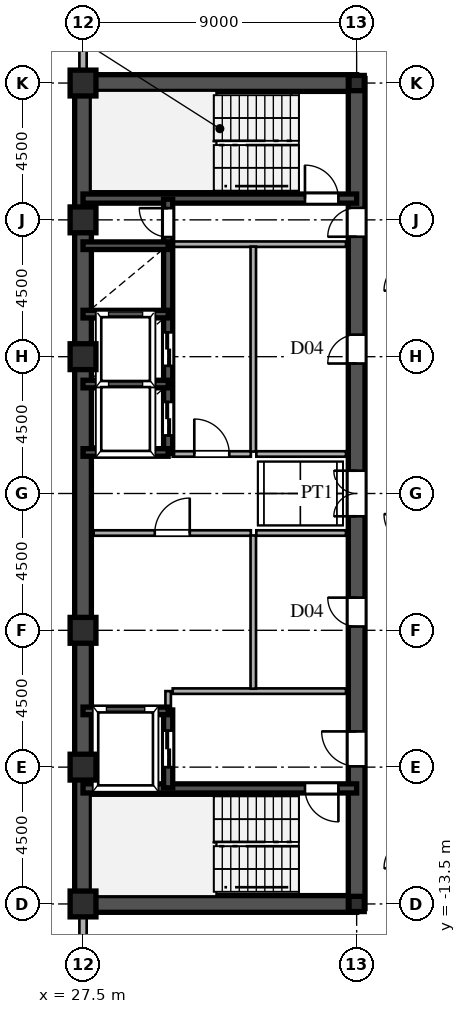
"""IFC4 building model, lengths in metres.
Left out: names, types, materials, properties, quantities, classifications, styles, units other than length and angle.
Written with IfcOpenShell. Run it as: python <this file> out.ifc"""

import sys

from ifc_helpers import new_model, si_unit, direction, frame, frame_2d, origin, origin_2d, place, context, subcontext, project, spatial, rectangle, hollow_rectangle, i_section, extrude, source, transform, mapped, element, fill, save


model = new_model("IFC4")
c1 = context("Model", 3, precision=1e-05, world=origin(), true_north=direction((0.0, 1.0)))
c2 = subcontext(c1, "Body", "Model", "MODEL_VIEW")
j1 = project(units=[si_unit("LENGTHUNIT", "METRE"), si_unit("PLANEANGLEUNIT", "RADIAN")], contexts=[c1])
p1 = place(None, origin())
s1 = spatial("IfcSite", under=j1, at=p1, CompositionType="ELEMENT")
p2 = place(p1, origin())
s2 = spatial("IfcBuilding", under=s1, at=p2, CompositionType="ELEMENT")
p3 = place(p2, frame((0.0, 0.0, 199.5)))
s3 = spatial("IfcBuildingStorey", under=s2, at=p3, CompositionType="ELEMENT", Elevation=199.5)
m1 = source(origin(), c2, "Body", "SweptSolid", [
    extrude(hollow_rectangle(XDim=0.85, YDim=0.85, WallThickness=0.036, at=origin_2d()), origin(), (0.0, 0.0, 1.0), 3.6),
])
for number, where, z_axis, x_axis in (
    (1, (27.5, -13.5, 0.0), (0.0, 0.0, 1.0), (1.0, 0.0, 0.0)),
    (2, (27.5, -9.0, 0.0), (0.0, 0.0, 1.0), (1.0, 0.0, 0.0)),
    (3, (27.5, -4.5, 0.0), (0.0, 0.0, 1.0), (1.0, 0.0, 0.0)),
    (4, (27.5, 4.5, 0.0), (0.0, 0.0, 1.0), (1.0, 0.0, 0.0)),
    (5, (27.5, 9.0, 0.0), (0.0, 0.0, 1.0), (1.0, 0.0, 0.0)),
    (6, (27.5, 13.5, 0.0), (0.0, 0.0, 1.0), (1.0, 0.0, 0.0)),
):
    element("IfcColumn", number, at=place(p3, frame(where, z_axis=z_axis, x_axis=x_axis)), inside=s3, PredefinedType="COLUMN", context=c2, shape_type="MappedRepresentation", body=[
        mapped(m1, transform((0.0, 0.0, 0.0), scale=1.0)),
    ])
m2 = source(origin(), c2, "Body", "SweptSolid", [
    extrude(i_section(OverallWidth=0.5, OverallDepth=0.5, WebThickness=0.02, FlangeThickness=0.032, at=origin_2d()), origin(), (0.0, 0.0, 1.0), 3.6),
])
for number, where, z_axis, x_axis in (
    (7, (36.5, -13.5, 0.0), (0.0, 0.0, 1.0), (1.0, 0.0, 0.0)),
    (8, (36.5, 13.5, 0.0), (0.0, 0.0, 1.0), (1.0, 0.0, 0.0)),
):
    element("IfcColumn", number, at=place(p3, frame(where, z_axis=z_axis, x_axis=x_axis)), inside=s3, PredefinedType="COLUMN", context=c2, shape_type="MappedRepresentation", body=[
        mapped(m2, transform((0.0, 0.0, 0.0), scale=1.0)),
    ])
p4 = place(p3, frame((27.5, -15.98, 0.0), z_axis=(0.0, 0.0, 1.0), x_axis=(0.0, 1.0, 0.0)))
e9 = element("IfcWall", 9, at=p4, inside=s3, PredefinedType="SOLIDWALL", context=c2, shape_type="SweptSolid", body=[
    extrude(rectangle(XDim=1.6, YDim=0.24, at=frame_2d((0.8, 0.0))), origin(), (0.0, 0.0, 1.0), 3.38),
])
for number, where, z_axis, x_axis in (
    (10, (27.5, -14.38, 0.0), (0.0, 0.0, 1.0), (0.0, 1.0, 0.0)),
    (11, (27.5, 13.78, 0.0), (0.0, 0.0, 1.0), (0.0, 1.0, 0.0)),
):
    element("IfcWall", number, at=place(p3, frame(where, z_axis=z_axis, x_axis=x_axis)), inside=s3, PredefinedType="SOLIDWALL", context=c2, shape_type="SweptSolid", body=[
        extrude(rectangle(XDim=0.6, YDim=0.24, at=frame_2d((0.3, 0.0))), origin(), (0.0, 0.0, 1.0), 2.88),
    ])
p5 = place(p3, frame((27.5, 14.38, 0.0), z_axis=(0.0, 0.0, 1.0), x_axis=(0.0, 1.0, 0.0)))
e12 = element("IfcWall", 12, at=p5, inside=s3, PredefinedType="SOLIDWALL", context=c2, shape_type="SweptSolid", body=[
    extrude(rectangle(XDim=1.6, YDim=0.24, at=frame_2d((0.8, 0.0))), origin(), (0.0, 0.0, 1.0), 3.38),
])
for number, where, z_axis, x_axis in (
    (13, (27.5, -13.5, 0.0), (0.0, 0.0, 1.0), (0.0, 1.0, 0.0)),
    (14, (27.5, 1.3, 0.0), (0.0, 0.0, 1.0), (0.0, 1.0, 0.0)),
):
    element("IfcWall", number, at=place(p3, frame(where, z_axis=z_axis, x_axis=x_axis)), inside=s3, PredefinedType="SHEAR", context=c2, shape_type="SweptSolid", body=[
        extrude(rectangle(XDim=12.2, YDim=0.55, at=frame_2d((6.1, 0.0))), origin(), (0.0, 0.0, 1.0), 3.38),
    ])
p6 = place(p3, frame((27.5, -1.3, 0.0), z_axis=(0.0, 0.0, 1.0), x_axis=(0.0, 1.0, 0.0)))
e15 = element("IfcWall", 15, at=p6, inside=s3, PredefinedType="SHEAR", context=c2, shape_type="SweptSolid", body=[
    extrude(rectangle(XDim=2.6, YDim=0.55, at=frame_2d((1.3, 0.0))), origin(), (0.0, 0.0, 1.0), 3.38),
])
for number, where, z_axis, x_axis in (
    (16, (27.5, -13.5, 0.0), (0.0, 0.0, 1.0), (1.0, 0.0, 0.0)),
    (17, (27.5, 13.5, 0.0), (0.0, 0.0, 1.0), (1.0, 0.0, 0.0)),
):
    element("IfcWall", number, at=place(p3, frame(where, z_axis=z_axis, x_axis=x_axis)), inside=s3, PredefinedType="SHEAR", context=c2, shape_type="SweptSolid", body=[
        extrude(rectangle(XDim=9.0, YDim=0.55, at=frame_2d((4.5, 0.0))), origin(), (0.0, 0.0, 1.0), 3.38),
    ])
p7 = place(p3, frame((36.5, -13.65, 0.0), z_axis=(0.0, 0.0, 1.0), x_axis=(0.0, 1.0, 0.0)))
e18 = element("IfcWall", 18, at=p7, inside=s3, PredefinedType="SHEAR", context=c2, shape_type="SweptSolid", body=[
    extrude(rectangle(XDim=7.15, YDim=0.55, at=frame_2d((3.575, 0.0))), origin(), (0.0, 0.0, 1.0), 3.38),
])
p8 = place(p7, frame((4.675, 0.0, 0.0)))
e19 = element("IfcOpeningElement", 19, at=p8, cuts=e18, PredefinedType="OPENING", context=c2, shape_type="SweptSolid", body=[
    extrude(rectangle(XDim=1.15, YDim=2.2, at=frame_2d((0.575, 1.1))), frame((0.0, 0.285, 0.0), z_axis=(0.0, -1.0, 0.0), x_axis=(1.0, 0.0, 0.0)), (0.0, 0.0, 1.0), 0.57),
])
p9 = place(p3, frame((36.5, -1.3, 0.0), z_axis=(0.0, 0.0, 1.0), x_axis=(0.0, 1.0, 0.0)))
e20 = element("IfcWall", 20, at=p9, inside=s3, PredefinedType="SHEAR", context=c2, shape_type="SweptSolid", body=[
    extrude(rectangle(XDim=2.6, YDim=0.55, at=frame_2d((1.3, 0.0))), origin(), (0.0, 0.0, 1.0), 3.38),
])
p10 = place(p9, frame((0.55, 0.0, 0.0)))
e21 = element("IfcOpeningElement", 21, at=p10, cuts=e20, PredefinedType="OPENING", context=c2, shape_type="SweptSolid", body=[
    extrude(rectangle(XDim=1.5, YDim=2.3, at=frame_2d((0.75, 1.15))), frame((0.0, 0.285, 0.0), z_axis=(0.0, -1.0, 0.0), x_axis=(1.0, 0.0, 0.0)), (0.0, 0.0, 1.0), 0.57),
])
p11 = place(p3, frame((36.5, 8.2, 0.0), z_axis=(0.0, 0.0, 1.0), x_axis=(0.0, 1.0, 0.0)))
e22 = element("IfcWall", 22, at=p11, inside=s3, PredefinedType="SHEAR", context=c2, shape_type="SweptSolid", body=[
    extrude(rectangle(XDim=5.45, YDim=0.55, at=frame_2d((2.725, 0.0))), origin(), (0.0, 0.0, 1.0), 3.38),
])
p12 = place(p11, frame((0.245, 0.0, 0.0)))
e23 = element("IfcOpeningElement", 23, at=p12, cuts=e22, PredefinedType="OPENING", context=c2, shape_type="SweptSolid", body=[
    extrude(rectangle(XDim=0.95, YDim=2.15, at=frame_2d((0.475, 1.075))), frame((0.0, 0.285, 0.0), z_axis=(0.0, -1.0, 0.0), x_axis=(1.0, 0.0, 0.0)), (0.0, 0.0, 1.0), 0.57),
])
p13 = place(p3, frame((36.5, -6.5, 0.0), z_axis=(0.0, 0.0, 1.0), x_axis=(0.0, 1.0, 0.0)))
e24 = element("IfcWall", 24, at=p13, inside=s3, PredefinedType="SHEAR", context=c2, shape_type="SweptSolid", body=[
    extrude(rectangle(XDim=5.2, YDim=0.55, at=frame_2d((2.6, 0.0))), origin(), (0.0, 0.0, 1.0), 3.38),
])
p14 = place(p13, frame((2.125, 0.0, 0.0)))
e25 = element("IfcOpeningElement", 25, at=p14, cuts=e24, PredefinedType="OPENING", context=c2, shape_type="SweptSolid", body=[
    extrude(rectangle(XDim=0.95, YDim=2.15, at=frame_2d((0.475, 1.075))), frame((0.0, 0.285, 0.0), z_axis=(0.0, -1.0, 0.0), x_axis=(1.0, 0.0, 0.0)), (0.0, 0.0, 1.0), 0.57),
])
p15 = place(p3, frame((36.5, 1.3, 0.0), z_axis=(0.0, 0.0, 1.0), x_axis=(0.0, 1.0, 0.0)))
e26 = element("IfcWall", 26, at=p15, inside=s3, PredefinedType="SHEAR", context=c2, shape_type="SweptSolid", body=[
    extrude(rectangle(XDim=6.9, YDim=0.55, at=frame_2d((3.45, 0.0))), origin(), (0.0, 0.0, 1.0), 3.38),
])
p16 = place(p15, frame((2.975, 0.0, 0.0)))
e27 = element("IfcOpeningElement", 27, at=p16, cuts=e26, PredefinedType="OPENING", context=c2, shape_type="SweptSolid", body=[
    extrude(rectangle(XDim=0.95, YDim=2.15, at=frame_2d((0.475, 1.075))), frame((0.0, 0.285, 0.0), z_axis=(0.0, -1.0, 0.0), x_axis=(1.0, 0.0, 0.0)), (0.0, 0.0, 1.0), 0.57),
])
p17 = place(p3, frame((27.5, -9.7, 0.0), z_axis=(0.0, 0.0, 1.0), x_axis=(1.0, 0.0, 0.0)))
e28 = element("IfcWall", 28, at=p17, inside=s3, PredefinedType="SHEAR", context=c2, shape_type="SweptSolid", body=[
    extrude(rectangle(XDim=9.0, YDim=0.3, at=frame_2d((4.5, 0.0))), origin(), (0.0, 0.0, 1.0), 3.38),
])
p18 = place(p17, frame((7.3, 0.0, 0.0)))
e29 = element("IfcOpeningElement", 29, at=p18, cuts=e28, PredefinedType="OPENING", context=c2, shape_type="SweptSolid", body=[
    extrude(rectangle(XDim=1.1, YDim=2.2, at=frame_2d((0.55, 1.1))), frame((0.0, 0.16, 0.0), z_axis=(0.0, -1.0, 0.0), x_axis=(1.0, 0.0, 0.0)), (0.0, 0.0, 1.0), 0.32),
])
p19 = place(p3, frame((27.5, 9.7, 0.0), z_axis=(0.0, 0.0, 1.0), x_axis=(1.0, 0.0, 0.0)))
e30 = element("IfcWall", 30, at=p19, inside=s3, PredefinedType="SHEAR", context=c2, shape_type="SweptSolid", body=[
    extrude(rectangle(XDim=9.0, YDim=0.3, at=frame_2d((4.5, 0.0))), origin(), (0.0, 0.0, 1.0), 3.38),
])
p20 = place(p19, frame((7.3, 0.0, 0.0)))
e31 = element("IfcOpeningElement", 31, at=p20, cuts=e30, PredefinedType="OPENING", context=c2, shape_type="SweptSolid", body=[
    extrude(rectangle(XDim=1.1, YDim=2.2, at=frame_2d((0.55, 1.1))), frame((0.0, 0.16, 0.0), z_axis=(0.0, -1.0, 0.0), x_axis=(1.0, 0.0, 0.0)), (0.0, 0.0, 1.0), 0.32),
])
for number, where, z_axis, x_axis in (
    (32, (27.5, -7.15, 0.0), (0.0, 0.0, 1.0), (1.0, 0.0, 0.0)),
    (33, (27.5, 1.35, 0.0), (0.0, 0.0, 1.0), (1.0, 0.0, 0.0)),
    (34, (27.5, 3.6, 0.0), (0.0, 0.0, 1.0), (1.0, 0.0, 0.0)),
    (35, (27.5, 5.9, 0.0), (0.0, 0.0, 1.0), (1.0, 0.0, 0.0)),
    (36, (27.5, 8.15, 0.0), (0.0, 0.0, 1.0), (1.0, 0.0, 0.0)),
):
    element("IfcWall", number, at=place(p3, frame(where, z_axis=z_axis, x_axis=x_axis)), inside=s3, PredefinedType="SHEAR", context=c2, shape_type="SweptSolid", body=[
        extrude(rectangle(XDim=2.8, YDim=0.25, at=frame_2d((1.4, 0.0))), origin(), (0.0, 0.0, 1.0), 3.38),
    ])
p21 = place(p3, frame((30.3, -9.68, 0.0), z_axis=(0.0, 0.0, 1.0), x_axis=(0.0, 1.0, 0.0)))
e37 = element("IfcWall", 37, at=p21, inside=s3, PredefinedType="SHEAR", context=c2, shape_type="SweptSolid", body=[
    extrude(rectangle(XDim=2.56, YDim=0.3, at=frame_2d((1.28, 0.0))), origin(), (0.0, 0.0, 1.0), 3.38),
])
p22 = place(p21, frame((0.68, 0.0, 0.0)))
e38 = element("IfcOpeningElement", 38, at=p22, cuts=e37, PredefinedType="OPENING", context=c2, shape_type="SweptSolid", body=[
    extrude(rectangle(XDim=1.2, YDim=2.25, at=frame_2d((0.6, 1.125))), frame((0.0, 0.16, 0.0), z_axis=(0.0, -1.0, 0.0), x_axis=(1.0, 0.0, 0.0)), (0.0, 0.0, 1.0), 0.32),
])
p23 = place(p3, frame((30.3, 1.32, 0.0), z_axis=(0.0, 0.0, 1.0), x_axis=(0.0, 1.0, 0.0)))
e39 = element("IfcWall", 39, at=p23, inside=s3, PredefinedType="SHEAR", context=c2, shape_type="SweptSolid", body=[
    extrude(rectangle(XDim=2.28, YDim=0.3, at=frame_2d((1.14, 0.0))), origin(), (0.0, 0.0, 1.0), 3.38),
])
p24 = place(p23, frame((0.59, 0.0, 0.0)))
e40 = element("IfcOpeningElement", 40, at=p24, cuts=e39, PredefinedType="OPENING", context=c2, shape_type="SweptSolid", body=[
    extrude(rectangle(XDim=1.1, YDim=2.2, at=frame_2d((0.55, 1.1))), frame((0.0, 0.16, 0.0), z_axis=(0.0, -1.0, 0.0), x_axis=(1.0, 0.0, 0.0)), (0.0, 0.0, 1.0), 0.32),
])
p25 = place(p3, frame((30.3, 3.6, 0.0), z_axis=(0.0, 0.0, 1.0), x_axis=(0.0, 1.0, 0.0)))
e41 = element("IfcWall", 41, at=p25, inside=s3, PredefinedType="SHEAR", context=c2, shape_type="SweptSolid", body=[
    extrude(rectangle(XDim=2.3, YDim=0.3, at=frame_2d((1.15, 0.0))), origin(), (0.0, 0.0, 1.0), 3.38),
])
p26 = place(p25, frame((0.6, 0.0, 0.0)))
e42 = element("IfcOpeningElement", 42, at=p26, cuts=e41, PredefinedType="OPENING", context=c2, shape_type="SweptSolid", body=[
    extrude(rectangle(XDim=1.1, YDim=2.2, at=frame_2d((0.55, 1.1))), frame((0.0, 0.16, 0.0), z_axis=(0.0, -1.0, 0.0), x_axis=(1.0, 0.0, 0.0)), (0.0, 0.0, 1.0), 0.32),
])
p27 = place(p3, frame((30.3, 5.9, 0.0), z_axis=(0.0, 0.0, 1.0), x_axis=(0.0, 1.0, 0.0)))
e43 = element("IfcWall", 43, at=p27, inside=s3, PredefinedType="SHEAR", context=c2, shape_type="SweptSolid", body=[
    extrude(rectangle(XDim=2.25, YDim=0.3, at=frame_2d((1.125, 0.0))), origin(), (0.0, 0.0, 1.0), 3.38),
])
p28 = place(p3, frame((30.3, 8.15, 0.0), z_axis=(0.0, 0.0, 1.0), x_axis=(0.0, 1.0, 0.0)))
e44 = element("IfcWall", 44, at=p28, inside=s3, PredefinedType="SHEAR", context=c2, shape_type="SweptSolid", body=[
    extrude(rectangle(XDim=1.53, YDim=0.3, at=frame_2d((0.765, 0.0))), origin(), (0.0, 0.0, 1.0), 3.38),
])
p29 = place(p28, frame((0.285, 0.0, 0.0)))
e45 = element("IfcOpeningElement", 45, at=p29, cuts=e44, PredefinedType="OPENING", context=c2, shape_type="SweptSolid", body=[
    extrude(rectangle(XDim=0.95, YDim=2.15, at=frame_2d((0.475, 1.075))), frame((0.0, 0.16, 0.0), z_axis=(0.0, -1.0, 0.0), x_axis=(1.0, 0.0, 0.0)), (0.0, 0.0, 1.0), 0.32),
])
p30 = place(p3, frame((30.45, -6.5, 0.0), z_axis=(0.0, 0.0, 1.0), x_axis=(1.0, 0.0, 0.0)))
e46 = element("IfcWall", 46, at=p30, inside=s3, PredefinedType="PARTITIONING", context=c2, shape_type="SweptSolid", body=[
    extrude(rectangle(XDim=5.7, YDim=0.18, at=frame_2d((2.85, 0.0))), origin(), (0.0, 0.0, 1.0), 3.38),
])
p31 = place(p3, frame((30.3, -7.12, 0.0), z_axis=(0.0, 0.0, 1.0), x_axis=(0.0, 1.0, 0.0)))
e47 = element("IfcWall", 47, at=p31, inside=s3, PredefinedType="PARTITIONING", context=c2, shape_type="SweptSolid", body=[
    extrude(rectangle(XDim=0.62, YDim=0.18, at=frame_2d((0.31, 0.0))), origin(), (0.0, 0.0, 1.0), 3.38),
])
p32 = place(p3, frame((30.45, 8.2, 0.0), z_axis=(0.0, 0.0, 1.0), x_axis=(1.0, 0.0, 0.0)))
e48 = element("IfcWall", 48, at=p32, inside=s3, PredefinedType="PARTITIONING", context=c2, shape_type="SweptSolid", body=[
    extrude(rectangle(XDim=5.7, YDim=0.18, at=frame_2d((2.85, 0.0))), origin(), (0.0, 0.0, 1.0), 3.38),
])
p33 = place(p3, frame((33.1, -6.42, 0.0), z_axis=(0.0, 0.0, 1.0), x_axis=(0.0, 1.0, 0.0)))
e49 = element("IfcWall", 49, at=p33, inside=s3, PredefinedType="PARTITIONING", context=c2, shape_type="SweptSolid", body=[
    extrude(rectangle(XDim=5.04, YDim=0.18, at=frame_2d((2.52, 0.0))), origin(), (0.0, 0.0, 1.0), 3.38),
])
p34 = place(p3, frame((33.1, 1.38, 0.0), z_axis=(0.0, 0.0, 1.0), x_axis=(0.0, 1.0, 0.0)))
e50 = element("IfcWall", 50, at=p34, inside=s3, PredefinedType="PARTITIONING", context=c2, shape_type="SweptSolid", body=[
    extrude(rectangle(XDim=6.74, YDim=0.18, at=frame_2d((3.37, 0.0))), origin(), (0.0, 0.0, 1.0), 3.38),
])
p35 = place(p3, frame((27.85, -1.3, 0.0), z_axis=(0.0, 0.0, 1.0), x_axis=(1.0, 0.0, 0.0)))
e51 = element("IfcWall", 51, at=p35, inside=s3, PredefinedType="PARTITIONING", context=c2, shape_type="SweptSolid", body=[
    extrude(rectangle(XDim=5.17, YDim=0.18, at=frame_2d((2.585, 0.0))), origin(), (0.0, 0.0, 1.0), 3.38),
])
p36 = place(p35, frame((2.01, 0.0, 0.0)))
e52 = element("IfcOpeningElement", 52, at=p36, cuts=e51, PredefinedType="OPENING", context=c2, shape_type="SweptSolid", body=[
    extrude(rectangle(XDim=1.15, YDim=2.2, at=frame_2d((0.575, 1.1))), frame((0.0, 0.1, 0.0), z_axis=(0.0, -1.0, 0.0), x_axis=(1.0, 0.0, 0.0)), (0.0, 0.0, 1.0), 0.2),
])
p37 = place(p3, frame((30.45, 1.3, 0.0), z_axis=(0.0, 0.0, 1.0), x_axis=(1.0, 0.0, 0.0)))
e53 = element("IfcWall", 53, at=p37, inside=s3, PredefinedType="PARTITIONING", context=c2, shape_type="SweptSolid", body=[
    extrude(rectangle(XDim=2.57, YDim=0.18, at=frame_2d((1.285, 0.0))), origin(), (0.0, 0.0, 1.0), 3.38),
])
p38 = place(p37, frame((0.71, 0.0, 0.0)))
e54 = element("IfcOpeningElement", 54, at=p38, cuts=e53, PredefinedType="OPENING", context=c2, shape_type="SweptSolid", body=[
    extrude(rectangle(XDim=1.15, YDim=2.2, at=frame_2d((0.575, 1.1))), frame((0.0, 0.1, 0.0), z_axis=(0.0, -1.0, 0.0), x_axis=(1.0, 0.0, 0.0)), (0.0, 0.0, 1.0), 0.2),
])
for number, where, z_axis, x_axis in (
    (55, (33.2, -1.3, 0.0), (0.0, 0.0, 1.0), (1.0, 0.0, 0.0)),
    (56, (33.2, 1.3, 0.0), (0.0, 0.0, 1.0), (1.0, 0.0, 0.0)),
):
    element("IfcWall", number, at=place(p3, frame(where, z_axis=z_axis, x_axis=x_axis)), inside=s3, PredefinedType="PARTITIONING", context=c2, shape_type="SweptSolid", body=[
        extrude(rectangle(XDim=2.95, YDim=0.18, at=frame_2d((1.475, 0.0))), origin(), (0.0, 0.0, 1.0), 3.38),
    ])
m3 = source(origin(), c2, "Body", "SweptSolid", [
    extrude(rectangle(XDim=1.15, YDim=2.2, at=frame_2d((0.575, 1.1))), frame((0.0, 0.025, 0.0), z_axis=(0.0, -1.0, 0.0), x_axis=(1.0, 0.0, 0.0)), (0.0, 0.0, 1.0), 0.05),
])
p39 = place(p8, origin())
e57 = element("IfcDoor", 57, at=p39, inside=s3, OperationType="SINGLE_SWING_RIGHT", PredefinedType="DOOR", context=c2, shape_type="MappedRepresentation", body=[
    mapped(m3, transform((0.0, 0.0, 0.0), scale=1.0)),
])
fill(e19, e57)
m4 = source(origin(), c2, "Body", "SweptSolid", [
    extrude(rectangle(XDim=1.5, YDim=2.3, at=frame_2d((0.75, 1.15))), frame((0.0, 0.025, 0.0), z_axis=(0.0, -1.0, 0.0), x_axis=(1.0, 0.0, 0.0)), (0.0, 0.0, 1.0), 0.05),
])
p40 = place(p10, origin())
e58 = element("IfcDoor", 58, at=p40, inside=s3, OperationType="DOUBLE_SWING_LEFT", PredefinedType="DOOR", context=c2, shape_type="MappedRepresentation", body=[
    mapped(m4, transform((0.0, 0.0, 0.0), scale=1.0)),
])
fill(e21, e58)
m5 = source(origin(), c2, "Body", "SweptSolid", [
    extrude(rectangle(XDim=0.95, YDim=2.15, at=frame_2d((0.475, 1.075))), frame((0.0, 0.025, 0.0), z_axis=(0.0, -1.0, 0.0), x_axis=(1.0, 0.0, 0.0)), (0.0, 0.0, 1.0), 0.05),
])
p41 = place(p12, origin())
e59 = element("IfcDoor", 59, at=p41, inside=s3, OperationType="SINGLE_SWING_LEFT", PredefinedType="DOOR", context=c2, shape_type="MappedRepresentation", body=[
    mapped(m5, transform((0.0, 0.0, 0.0), scale=1.0)),
])
fill(e23, e59)
p42 = place(p14, origin())
e60 = element("IfcDoor", 60, at=p42, inside=s3, OperationType="SINGLE_SWING_RIGHT", PredefinedType="DOOR", context=c2, shape_type="MappedRepresentation", body=[
    mapped(m5, transform((0.0, 0.0, 0.0), scale=1.0)),
])
fill(e25, e60)
p43 = place(p16, origin())
e61 = element("IfcDoor", 61, at=p43, inside=s3, OperationType="SINGLE_SWING_LEFT", PredefinedType="DOOR", context=c2, shape_type="MappedRepresentation", body=[
    mapped(m5, transform((0.0, 0.0, 0.0), scale=1.0)),
])
fill(e27, e61)
m6 = source(origin(), c2, "Body", "SweptSolid", [
    extrude(rectangle(XDim=1.1, YDim=2.2, at=frame_2d((0.55, 1.1))), frame((0.0, 0.025, 0.0), z_axis=(0.0, -1.0, 0.0), x_axis=(1.0, 0.0, 0.0)), (0.0, 0.0, 1.0), 0.05),
])
p44 = place(p18, frame((1.1, 0.0, 0.0), z_axis=(0.0, 0.0, 1.0), x_axis=(-1.0, 0.0, 0.0)))
e62 = element("IfcDoor", 62, at=p44, inside=s3, OperationType="SINGLE_SWING_RIGHT", PredefinedType="DOOR", context=c2, shape_type="MappedRepresentation", body=[
    mapped(m6, transform((0.0, 0.0, 0.0), scale=1.0)),
])
fill(e29, e62)
p45 = place(p20, origin())
e63 = element("IfcDoor", 63, at=p45, inside=s3, OperationType="SINGLE_SWING_LEFT", PredefinedType="DOOR", context=c2, shape_type="MappedRepresentation", body=[
    mapped(m6, transform((0.0, 0.0, 0.0), scale=1.0)),
])
fill(e31, e63)
m7 = source(origin(), c2, "Body", "SweptSolid", [
    extrude(rectangle(XDim=1.2, YDim=2.25, at=frame_2d((0.6, 1.125))), frame((0.0, 0.025, 0.0), z_axis=(0.0, -1.0, 0.0), x_axis=(1.0, 0.0, 0.0)), (0.0, 0.0, 1.0), 0.05),
])
p46 = place(p22, origin())
e64 = element("IfcDoor", 64, at=p46, inside=s3, OperationType="DOUBLE_DOOR_SLIDING", PredefinedType="DOOR", context=c2, shape_type="MappedRepresentation", body=[
    mapped(m7, transform((0.0, 0.0, 0.0), scale=1.0)),
])
fill(e38, e64)
m8 = source(origin(), c2, "Body", "SweptSolid", [
    extrude(rectangle(XDim=1.1, YDim=2.2, at=frame_2d((0.55, 1.1))), frame((0.0, 0.025, 0.0), z_axis=(0.0, -1.0, 0.0), x_axis=(1.0, 0.0, 0.0)), (0.0, 0.0, 1.0), 0.05),
])
p47 = place(p24, origin())
e65 = element("IfcDoor", 65, at=p47, inside=s3, OperationType="DOUBLE_DOOR_SLIDING", PredefinedType="DOOR", context=c2, shape_type="MappedRepresentation", body=[
    mapped(m8, transform((0.0, 0.0, 0.0), scale=1.0)),
])
fill(e40, e65)
p48 = place(p26, origin())
e66 = element("IfcDoor", 66, at=p48, inside=s3, OperationType="DOUBLE_DOOR_SLIDING", PredefinedType="DOOR", context=c2, shape_type="MappedRepresentation", body=[
    mapped(m8, transform((0.0, 0.0, 0.0), scale=1.0)),
])
fill(e42, e66)
p49 = place(p29, origin())
e67 = element("IfcDoor", 67, at=p49, inside=s3, OperationType="SINGLE_SWING_RIGHT", PredefinedType="DOOR", context=c2, shape_type="MappedRepresentation", body=[
    mapped(m5, transform((0.0, 0.0, 0.0), scale=1.0)),
])
fill(e45, e67)
p50 = place(p36, origin())
e68 = element("IfcDoor", 68, at=p50, inside=s3, OperationType="SINGLE_SWING_RIGHT", PredefinedType="DOOR", context=c2, shape_type="MappedRepresentation", body=[
    mapped(m3, transform((0.0, 0.0, 0.0), scale=1.0)),
])
fill(e52, e68)
p51 = place(p38, origin())
e69 = element("IfcDoor", 69, at=p51, inside=s3, OperationType="SINGLE_SWING_LEFT", PredefinedType="DOOR", context=c2, shape_type="MappedRepresentation", body=[
    mapped(m3, transform((0.0, 0.0, 0.0), scale=1.0)),
])
fill(e54, e69)
save(model, sys.argv[1])
